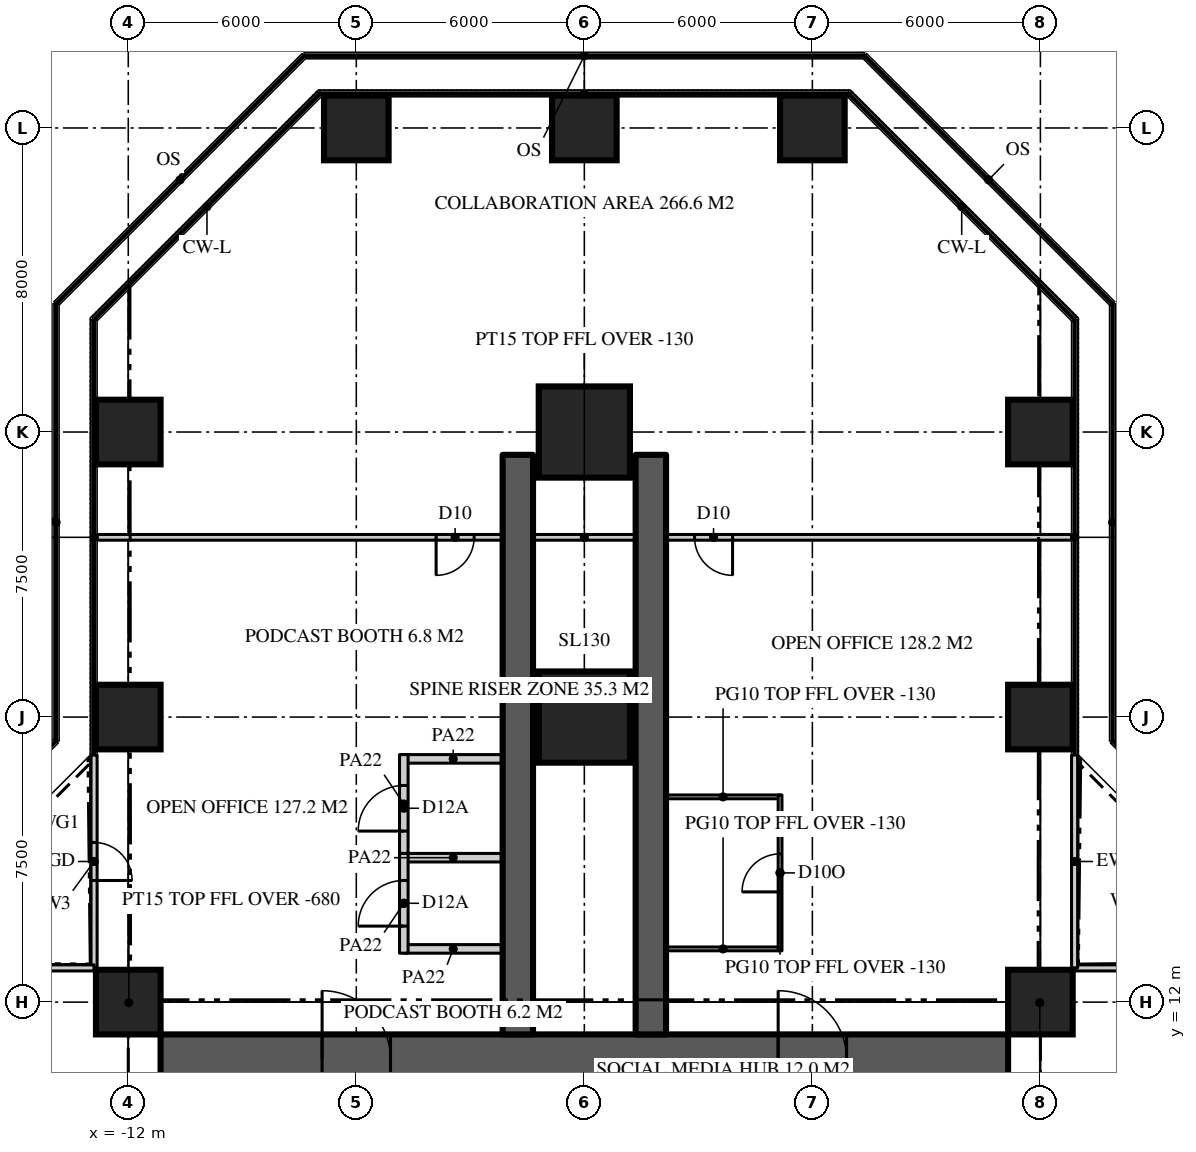
"""IFC4 building model, lengths in metres.
Left out: names, types, materials, properties, quantities, classifications, styles, units other than length and angle.
Written with IfcOpenShell. Run it as: python <this file> out.ifc"""

import sys

from ifc_helpers import new_model, si_unit, direction, frame, frame_2d, origin, origin_2d, place, context, subcontext, project, spatial, rectangle, extrude, element, fill, save


model = new_model("IFC4")
c1 = context("Model", 3, precision=1e-05, world=origin(), true_north=direction((0.0, 1.0)))
c2 = subcontext(c1, "Body", "Model", "MODEL_VIEW")
j1 = project(units=[si_unit("LENGTHUNIT", "METRE"), si_unit("PLANEANGLEUNIT", "RADIAN")], contexts=[c1])
p1 = place(None, origin())
s1 = spatial("IfcSite", under=j1, at=p1, CompositionType="ELEMENT")
p2 = place(p1, origin())
s2 = spatial("IfcBuilding", under=s1, at=p2, CompositionType="ELEMENT")
p3 = place(p2, frame((0.0, 0.0, 66.9)))
s3 = spatial("IfcBuildingStorey", under=s2, at=p3, CompositionType="ELEMENT", Elevation=66.9)
p4 = place(p3, frame((-11.15, 10.5, 0.0), z_axis=(0.0, 0.0, 1.0), x_axis=(1.0, 0.0, 0.0)))
e1 = element("IfcWall", 1, at=p4, inside=s3, PredefinedType="SHEAR", context=c2, shape_type="SweptSolid", body=[
    extrude(rectangle(XDim=22.3, YDim=1.3, at=frame_2d((11.15, 0.0))), origin(), (0.0, 0.0, 1.0), 3.9),
])
p5 = place(p4, frame((4.25, 0.0, 0.0)))
e2 = element("IfcOpeningElement", 2, at=p5, cuts=e1, PredefinedType="OPENING", context=c2, shape_type="SweptSolid", body=[
    extrude(rectangle(XDim=1.8, YDim=2.2, at=frame_2d((0.9, 1.1))), frame((0.0, 0.66, 0.0), z_axis=(0.0, -1.0, 0.0), x_axis=(1.0, 0.0, 0.0)), (0.0, 0.0, 1.0), 1.32),
])
p6 = place(p4, frame((16.25, 0.0, 0.0)))
e3 = element("IfcOpeningElement", 3, at=p6, cuts=e1, PredefinedType="OPENING", context=c2, shape_type="SweptSolid", body=[
    extrude(rectangle(XDim=1.8, YDim=2.2, at=frame_2d((0.9, 1.1))), frame((0.0, 0.66, 0.0), z_axis=(0.0, -1.0, 0.0), x_axis=(1.0, 0.0, 0.0)), (0.0, 0.0, 1.0), 1.32),
])
for number, where, z_axis, x_axis in (
    (4, (1.75, 11.15, 0.0), (0.0, 0.0, 1.0), (0.0, 1.0, 0.0)),
    (5, (-1.75, 11.15, 0.0), (0.0, 0.0, 1.0), (0.0, 1.0, 0.0)),
):
    element("IfcWall", number, at=place(p3, frame(where, z_axis=z_axis, x_axis=x_axis)), inside=s3, PredefinedType="SHEAR", context=c2, shape_type="SweptSolid", body=[
        extrude(rectangle(XDim=15.25, YDim=0.8, at=frame_2d((7.625, 0.0))), origin(), (0.0, 0.0, 1.0), 3.9),
    ])
for number, where, z_axis, x_axis in (
    (6, (-12.0, 12.0, 0.0), (0.0, 0.0, 1.0), (1.0, 0.0, 0.0)),
    (7, (12.0, 12.0, 0.0), (0.0, 0.0, 1.0), (1.0, 0.0, 0.0)),
    (8, (-12.0, 19.5, 0.0), (0.0, 0.0, 1.0), (1.0, 0.0, 0.0)),
):
    element("IfcColumn", number, at=place(p3, frame(where, z_axis=z_axis, x_axis=x_axis)), inside=s3, PredefinedType="COLUMN", context=c2, shape_type="SweptSolid", body=[
        extrude(rectangle(XDim=1.7, YDim=1.7, at=origin_2d()), origin(), (0.0, 0.0, 1.0), 3.9),
    ])
p7 = place(p3, frame((0.0, 19.5, 0.0), z_axis=(0.0, 0.0, 1.0), x_axis=(1.0, 0.0, 0.0)))
e9 = element("IfcColumn", 9, at=p7, inside=s3, PredefinedType="COLUMN", context=c2, shape_type="SweptSolid", body=[
    extrude(rectangle(XDim=2.4, YDim=2.4, at=origin_2d()), origin(), (0.0, 0.0, 1.0), 3.9),
])
for number, where, z_axis, x_axis in (
    (10, (12.0, 19.5, 0.0), (0.0, 0.0, 1.0), (1.0, 0.0, 0.0)),
    (11, (-12.0, 27.0, 0.0), (0.0, 0.0, 1.0), (1.0, 0.0, 0.0)),
):
    element("IfcColumn", number, at=place(p3, frame(where, z_axis=z_axis, x_axis=x_axis)), inside=s3, PredefinedType="COLUMN", context=c2, shape_type="SweptSolid", body=[
        extrude(rectangle(XDim=1.7, YDim=1.7, at=origin_2d()), origin(), (0.0, 0.0, 1.0), 3.9),
    ])
p8 = place(p3, frame((0.0, 27.0, 0.0), z_axis=(0.0, 0.0, 1.0), x_axis=(1.0, 0.0, 0.0)))
e12 = element("IfcColumn", 12, at=p8, inside=s3, PredefinedType="COLUMN", context=c2, shape_type="SweptSolid", body=[
    extrude(rectangle(XDim=2.4, YDim=2.4, at=origin_2d()), origin(), (0.0, 0.0, 1.0), 3.9),
])
for number, where, z_axis, x_axis in (
    (13, (12.0, 27.0, 0.0), (0.0, 0.0, 1.0), (1.0, 0.0, 0.0)),
    (14, (-6.0, 35.0, 0.0), (0.0, 0.0, 1.0), (1.0, 0.0, 0.0)),
    (15, (0.0, 35.0, 0.0), (0.0, 0.0, 1.0), (1.0, 0.0, 0.0)),
    (16, (6.0, 35.0, 0.0), (0.0, 0.0, 1.0), (1.0, 0.0, 0.0)),
):
    element("IfcColumn", number, at=place(p3, frame(where, z_axis=z_axis, x_axis=x_axis)), inside=s3, PredefinedType="COLUMN", context=c2, shape_type="SweptSolid", body=[
        extrude(rectangle(XDim=1.7, YDim=1.7, at=origin_2d()), origin(), (0.0, 0.0, 1.0), 3.9),
    ])
p9 = place(p3, frame((18.5, 12.9, 0.0), z_axis=(0.0, 0.0, 1.0), x_axis=(-1.0, 0.0, 0.0)))
e17 = element("IfcWall", 17, at=p9, inside=s3, PredefinedType="SOLIDWALL", context=c2, shape_type="SweptSolid", body=[
    extrude(rectangle(XDim=5.6, YDim=0.16, at=frame_2d((2.8, 0.0))), origin(), (0.0, 0.0, 1.0), 3.77),
])
p10 = place(p9, frame((2.3, 0.0, 0.0)))
e18 = element("IfcOpeningElement", 18, at=p10, cuts=e17, PredefinedType="OPENING", context=c2, shape_type="SweptSolid", body=[
    extrude(rectangle(XDim=1.0, YDim=2.2, at=frame_2d((0.5, 1.1))), frame((0.0, 0.09, 0.0), z_axis=(0.0, -1.0, 0.0), x_axis=(1.0, 0.0, 0.0)), (0.0, 0.0, 1.0), 0.18),
])
p11 = place(p3, frame((12.9, 12.9, 0.0), z_axis=(0.0, 0.0, 1.0), x_axis=(0.0, 1.0, 0.0)))
e19 = element("IfcWall", 19, at=p11, inside=s3, PredefinedType="SOLIDWALL", context=c2, shape_type="SweptSolid", body=[
    extrude(rectangle(XDim=5.6, YDim=0.16, at=frame_2d((2.8, 0.0))), origin(), (0.0, 0.0, 1.0), 3.77),
])
p12 = place(p3, frame((-12.9, 18.5, 0.0), z_axis=(0.0, 0.0, 1.0), x_axis=(0.0, -1.0, 0.0)))
e20 = element("IfcWall", 20, at=p12, inside=s3, PredefinedType="SOLIDWALL", context=c2, shape_type="SweptSolid", body=[
    extrude(rectangle(XDim=5.6, YDim=0.16, at=frame_2d((2.8, 0.0))), origin(), (0.0, 0.0, 1.0), 3.77),
])
p13 = place(p12, frame((2.3, 0.0, 0.0)))
e21 = element("IfcOpeningElement", 21, at=p13, cuts=e20, PredefinedType="OPENING", context=c2, shape_type="SweptSolid", body=[
    extrude(rectangle(XDim=1.0, YDim=2.2, at=frame_2d((0.5, 1.1))), frame((0.0, 0.09, 0.0), z_axis=(0.0, -1.0, 0.0), x_axis=(1.0, 0.0, 0.0)), (0.0, 0.0, 1.0), 0.18),
])
p14 = place(p3, frame((-12.9, 12.9, 0.0), z_axis=(0.0, 0.0, 1.0), x_axis=(-1.0, 0.0, 0.0)))
e22 = element("IfcWall", 22, at=p14, inside=s3, PredefinedType="SOLIDWALL", context=c2, shape_type="SweptSolid", body=[
    extrude(rectangle(XDim=5.6, YDim=0.16, at=frame_2d((2.8, 0.0))), origin(), (0.0, 0.0, 1.0), 3.77),
])
p15 = place(p3, frame((12.82, 24.229, 0.0), z_axis=(0.0, 0.0, 1.0), x_axis=(-1.0, 0.0, 0.0)))
e23 = element("IfcWall", 23, at=p15, inside=s3, PredefinedType="PARTITIONING", context=c2, shape_type="SweptSolid", body=[
    extrude(rectangle(XDim=25.64, YDim=0.15, at=frame_2d((12.82, 0.0))), origin(), (0.0, 0.0, 1.0), 3.77),
])
p16 = place(p15, frame((15.72, 0.0, 0.0)))
e24 = element("IfcOpeningElement", 24, at=p16, cuts=e23, PredefinedType="OPENING", context=c2, shape_type="SweptSolid", body=[
    extrude(rectangle(XDim=1.0, YDim=2.2, at=frame_2d((0.5, 1.1))), frame((0.0, 0.085, 0.0), z_axis=(0.0, -1.0, 0.0), x_axis=(1.0, 0.0, 0.0)), (0.0, 0.0, 1.0), 0.17),
])
p17 = place(p15, frame((8.92, 0.0, 0.0)))
e25 = element("IfcOpeningElement", 25, at=p17, cuts=e23, PredefinedType="OPENING", context=c2, shape_type="SweptSolid", body=[
    extrude(rectangle(XDim=1.0, YDim=2.2, at=frame_2d((0.5, 1.1))), frame((0.0, 0.085, 0.0), z_axis=(0.0, -1.0, 0.0), x_axis=(1.0, 0.0, 0.0)), (0.0, 0.0, 1.0), 0.17),
])
for number, where, z_axis, x_axis in (
    (26, (-2.15, 13.4, 0.0), (0.0, 0.0, 1.0), (-1.0, 0.0, 0.0)),
    (27, (-2.15, 15.8, 0.0), (0.0, 0.0, 1.0), (-1.0, 0.0, 0.0)),
):
    element("IfcWall", number, at=place(p3, frame(where, z_axis=z_axis, x_axis=x_axis)), inside=s3, PredefinedType="PARTITIONING", context=c2, shape_type="SweptSolid", body=[
        extrude(rectangle(XDim=2.6, YDim=0.225, at=frame_2d((1.3, 0.0))), origin(), (0.0, 0.0, 1.0), 3.77),
    ])
p18 = place(p3, frame((-4.75, 13.288, 0.0), z_axis=(0.0, 0.0, 1.0), x_axis=(0.0, 1.0, 0.0)))
e28 = element("IfcWall", 28, at=p18, inside=s3, PredefinedType="PARTITIONING", context=c2, shape_type="SweptSolid", body=[
    extrude(rectangle(XDim=2.625, YDim=0.225, at=frame_2d((1.312, 0.0))), origin(), (0.0, 0.0, 1.0), 3.77),
])
p19 = place(p18, frame((0.712, 0.0, 0.0)))
e29 = element("IfcOpeningElement", 29, at=p19, cuts=e28, PredefinedType="OPENING", context=c2, shape_type="SweptSolid", body=[
    extrude(rectangle(XDim=1.2, YDim=2.2, at=frame_2d((0.6, 1.1))), frame((0.0, 0.123, 0.0), z_axis=(0.0, -1.0, 0.0), x_axis=(1.0, 0.0, 0.0)), (0.0, 0.0, 1.0), 0.245),
])
p20 = place(p3, frame((-2.15, 18.4, 0.0), z_axis=(0.0, 0.0, 1.0), x_axis=(-1.0, 0.0, 0.0)))
e30 = element("IfcWall", 30, at=p20, inside=s3, PredefinedType="PARTITIONING", context=c2, shape_type="SweptSolid", body=[
    extrude(rectangle(XDim=2.6, YDim=0.225, at=frame_2d((1.3, 0.0))), origin(), (0.0, 0.0, 1.0), 3.77),
])
p21 = place(p3, frame((-4.75, 15.913, 0.0), z_axis=(0.0, 0.0, 1.0), x_axis=(0.0, 1.0, 0.0)))
e31 = element("IfcWall", 31, at=p21, inside=s3, PredefinedType="PARTITIONING", context=c2, shape_type="SweptSolid", body=[
    extrude(rectangle(XDim=2.6, YDim=0.225, at=frame_2d((1.3, 0.0))), origin(), (0.0, 0.0, 1.0), 3.77),
])
p22 = place(p21, frame((0.587, 0.0, 0.0)))
e32 = element("IfcOpeningElement", 32, at=p22, cuts=e31, PredefinedType="OPENING", context=c2, shape_type="SweptSolid", body=[
    extrude(rectangle(XDim=1.2, YDim=2.2, at=frame_2d((0.6, 1.1))), frame((0.0, 0.123, 0.0), z_axis=(0.0, -1.0, 0.0), x_axis=(1.0, 0.0, 0.0)), (0.0, 0.0, 1.0), 0.245),
])
for number, where, z_axis, x_axis in (
    (33, (2.15, 13.4, 0.0), (0.0, 0.0, 1.0), (1.0, 0.0, 0.0)),
    (34, (2.15, 17.4, 0.0), (0.0, 0.0, 1.0), (1.0, 0.0, 0.0)),
):
    element("IfcWall", number, at=place(p3, frame(where, z_axis=z_axis, x_axis=x_axis)), inside=s3, PredefinedType="PARTITIONING", context=c2, shape_type="SweptSolid", body=[
        extrude(rectangle(XDim=3.0, YDim=0.1, at=frame_2d((1.5, 0.0))), origin(), (0.0, 0.0, 1.0), 3.77),
    ])
p23 = place(p3, frame((5.15, 13.35, 0.0), z_axis=(0.0, 0.0, 1.0), x_axis=(0.0, 1.0, 0.0)))
e35 = element("IfcWall", 35, at=p23, inside=s3, PredefinedType="PARTITIONING", context=c2, shape_type="SweptSolid", body=[
    extrude(rectangle(XDim=4.1, YDim=0.1, at=frame_2d((2.05, 0.0))), origin(), (0.0, 0.0, 1.0), 3.77),
])
p24 = place(p23, frame((1.55, 0.0, 0.0)))
e36 = element("IfcOpeningElement", 36, at=p24, cuts=e35, PredefinedType="OPENING", context=c2, shape_type="SweptSolid", body=[
    extrude(rectangle(XDim=1.0, YDim=2.2, at=frame_2d((0.5, 1.1))), frame((0.0, 0.06, 0.0), z_axis=(0.0, -1.0, 0.0), x_axis=(1.0, 0.0, 0.0)), (0.0, 0.0, 1.0), 0.12),
])
for number, where, z_axis, x_axis in (
    (37, (11.15, 11.15, 0.0), (0.0, 0.0, 1.0), (0.707, 0.707, 0.0)),
    (38, (-11.15, 11.15, 0.0), (0.0, 0.0, 1.0), (-0.707, 0.707, 0.0)),
):
    element("IfcWall", number, at=place(p3, frame(where, z_axis=z_axis, x_axis=x_axis)), inside=s3, PredefinedType="PARTITIONING", context=c2, shape_type="SweptSolid", body=[
        extrude(rectangle(XDim=2.362, YDim=0.15, at=frame_2d((1.181, 0.0))), origin(), (0.0, 0.0, 1.0), 3.22),
    ])
p25 = place(p13, origin())
e39 = element("IfcDoor", 39, at=p25, inside=s3, OperationType="SINGLE_SWING_RIGHT", PredefinedType="DOOR", context=c2, shape_type="SweptSolid", body=[
    extrude(rectangle(XDim=1.0, YDim=2.2, at=frame_2d((0.5, 1.1))), frame((0.0, 0.025, 0.0), z_axis=(0.0, -1.0, 0.0), x_axis=(1.0, 0.0, 0.0)), (0.0, 0.0, 1.0), 0.05),
])
fill(e21, e39)
p26 = place(p5, origin())
e40 = element("IfcDoor", 40, at=p26, inside=s3, OperationType="DOUBLE_DOOR_DOUBLE_SWING", PredefinedType="DOOR", context=c2, shape_type="SweptSolid", body=[
    extrude(rectangle(XDim=1.8, YDim=2.2, at=frame_2d((0.9, 1.1))), frame((0.0, 0.025, 0.0), z_axis=(0.0, -1.0, 0.0), x_axis=(1.0, 0.0, 0.0)), (0.0, 0.0, 1.0), 0.05),
])
fill(e2, e40)
p27 = place(p6, origin())
e41 = element("IfcDoor", 41, at=p27, inside=s3, OperationType="DOUBLE_DOOR_DOUBLE_SWING", PredefinedType="DOOR", context=c2, shape_type="SweptSolid", body=[
    extrude(rectangle(XDim=1.8, YDim=2.2, at=frame_2d((0.9, 1.1))), frame((0.0, 0.025, 0.0), z_axis=(0.0, -1.0, 0.0), x_axis=(1.0, 0.0, 0.0)), (0.0, 0.0, 1.0), 0.05),
])
fill(e3, e41)
p28 = place(p16, origin())
e42 = element("IfcDoor", 42, at=p28, inside=s3, OperationType="SINGLE_SWING_RIGHT", PredefinedType="DOOR", context=c2, shape_type="SweptSolid", body=[
    extrude(rectangle(XDim=1.0, YDim=2.2, at=frame_2d((0.5, 1.1))), frame((0.0, 0.025, 0.0), z_axis=(0.0, -1.0, 0.0), x_axis=(1.0, 0.0, 0.0)), (0.0, 0.0, 1.0), 0.05),
])
fill(e24, e42)
p29 = place(p17, origin())
e43 = element("IfcDoor", 43, at=p29, inside=s3, OperationType="SINGLE_SWING_LEFT", PredefinedType="DOOR", context=c2, shape_type="SweptSolid", body=[
    extrude(rectangle(XDim=1.0, YDim=2.2, at=frame_2d((0.5, 1.1))), frame((0.0, 0.025, 0.0), z_axis=(0.0, -1.0, 0.0), x_axis=(1.0, 0.0, 0.0)), (0.0, 0.0, 1.0), 0.05),
])
fill(e25, e43)
p30 = place(p19, origin())
e44 = element("IfcDoor", 44, at=p30, inside=s3, OperationType="SINGLE_SWING_LEFT", PredefinedType="DOOR", context=c2, shape_type="SweptSolid", body=[
    extrude(rectangle(XDim=1.2, YDim=2.2, at=frame_2d((0.6, 1.1))), frame((0.0, 0.025, 0.0), z_axis=(0.0, -1.0, 0.0), x_axis=(1.0, 0.0, 0.0)), (0.0, 0.0, 1.0), 0.05),
])
fill(e29, e44)
p31 = place(p22, origin())
e45 = element("IfcDoor", 45, at=p31, inside=s3, OperationType="SINGLE_SWING_LEFT", PredefinedType="DOOR", context=c2, shape_type="SweptSolid", body=[
    extrude(rectangle(XDim=1.2, YDim=2.2, at=frame_2d((0.6, 1.1))), frame((0.0, 0.025, 0.0), z_axis=(0.0, -1.0, 0.0), x_axis=(1.0, 0.0, 0.0)), (0.0, 0.0, 1.0), 0.05),
])
fill(e32, e45)
p32 = place(p24, origin())
e46 = element("IfcDoor", 46, at=p32, inside=s3, OperationType="SINGLE_SWING_LEFT", PredefinedType="DOOR", context=c2, shape_type="SweptSolid", body=[
    extrude(rectangle(XDim=1.0, YDim=2.2, at=frame_2d((0.5, 1.1))), frame((0.0, 0.025, 0.0), z_axis=(0.0, -1.0, 0.0), x_axis=(1.0, 0.0, 0.0)), (0.0, 0.0, 1.0), 0.05),
])
fill(e36, e46)
save(model, sys.argv[1])
